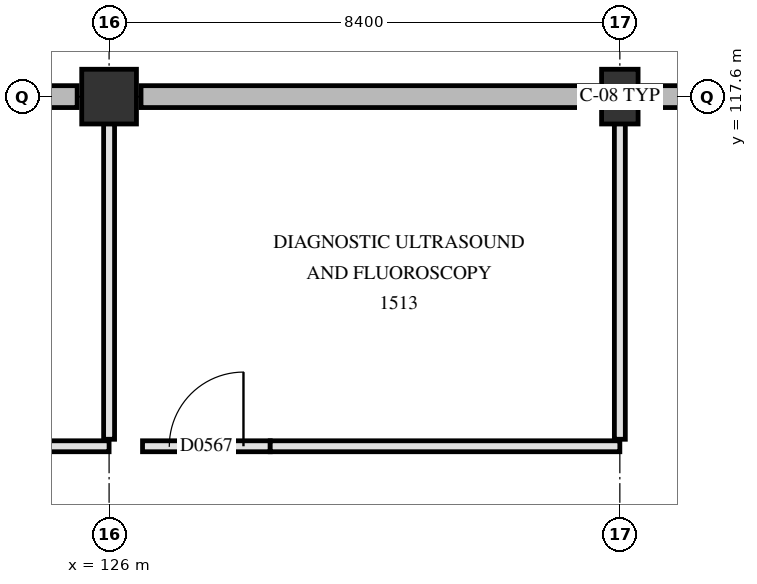
"""IFC4 building model, lengths in metres.
Left out: names, types, materials, properties, quantities, classifications, styles, units other than length and angle.
Written with IfcOpenShell. Run it as: python <this file> out.ifc"""

import sys

from ifc_helpers import new_model, si_unit, direction, frame, frame_2d, origin, origin_2d, place, context, subcontext, project, spatial, rectangle, extrude, element, fill, save


model = new_model("IFC4")
c1 = context("Model", 3, precision=1e-05, world=origin(), true_north=direction((0.0, 1.0)))
c2 = subcontext(c1, "Body", "Model", "MODEL_VIEW")
j1 = project(units=[si_unit("LENGTHUNIT", "METRE"), si_unit("PLANEANGLEUNIT", "RADIAN")], contexts=[c1])
p1 = place(None, origin())
s1 = spatial("IfcSite", under=j1, at=p1, CompositionType="ELEMENT")
p2 = place(p1, origin())
s2 = spatial("IfcBuilding", under=s1, at=p2, CompositionType="ELEMENT")
p3 = place(p2, origin())
s3 = spatial("IfcBuildingStorey", under=s2, at=p3, CompositionType="ELEMENT", Elevation=0.0)
p4 = place(p3, frame((126.0, 117.6, 0.0), z_axis=(0.0, 0.0, 1.0), x_axis=(1.0, 0.0, 0.0)))
e1 = element("IfcColumn", 1, at=p4, inside=s3, PredefinedType="COLUMN", context=c2, shape_type="SweptSolid", body=[
    extrude(rectangle(XDim=0.9, YDim=0.9, at=origin_2d()), origin(), (0.0, 0.0, 1.0), 4.8),
])
p5 = place(p3, frame((134.4, 117.6, 0.0), z_axis=(0.0, 0.0, 1.0), x_axis=(1.0, 0.0, 0.0)))
e2 = element("IfcColumn", 2, at=p5, inside=s3, PredefinedType="PILASTER", context=c2, shape_type="SweptSolid", body=[
    extrude(rectangle(XDim=0.6, YDim=0.9, at=origin_2d()), origin(), (0.0, 0.0, 1.0), 4.8),
])
p6 = place(p3, frame((118.125, 117.6, 0.0), z_axis=(0.0, 0.0, 1.0), x_axis=(1.0, 0.0, 0.0)))
e3 = element("IfcWall", 3, at=p6, inside=s3, PredefinedType="SOLIDWALL", context=c2, shape_type="SweptSolid", body=[
    extrude(rectangle(XDim=7.35, YDim=0.36, at=frame_2d((3.675, 0.0))), origin(), (0.0, 0.0, 1.0), 4.5),
])
p7 = place(p3, frame((126.525, 117.6, 0.0), z_axis=(0.0, 0.0, 1.0), x_axis=(1.0, 0.0, 0.0)))
e4 = element("IfcWall", 4, at=p7, inside=s3, PredefinedType="SOLIDWALL", context=c2, shape_type="SweptSolid", body=[
    extrude(rectangle(XDim=7.5, YDim=0.36, at=frame_2d((3.75, 0.0))), origin(), (0.0, 0.0, 1.0), 4.5),
])
p8 = place(p3, frame((134.775, 117.6, 0.0), z_axis=(0.0, 0.0, 1.0), x_axis=(1.0, 0.0, 0.0)))
e5 = element("IfcWall", 5, at=p8, inside=s3, PredefinedType="SOLIDWALL", context=c2, shape_type="SweptSolid", body=[
    extrude(rectangle(XDim=7.55, YDim=0.36, at=frame_2d((3.775, 0.0))), origin(), (0.0, 0.0, 1.0), 4.5),
])
p9 = place(p3, frame((117.6, 111.85, 0.0), z_axis=(0.0, 0.0, 1.0), x_axis=(1.0, 0.0, 0.0)))
e6 = element("IfcWall", 6, at=p9, inside=s3, PredefinedType="PARTITIONING", context=c2, shape_type="SweptSolid", body=[
    extrude(rectangle(XDim=8.4, YDim=0.18, at=frame_2d((4.2, 0.0))), origin(), (0.0, 0.0, 1.0), 3.89),
])
p10 = place(p9, frame((3.625, 0.0, 0.0)))
e7 = element("IfcOpeningElement", 7, at=p10, cuts=e6, PredefinedType="OPENING", context=c2, shape_type="SweptSolid", body=[
    extrude(rectangle(XDim=1.15, YDim=2.15, at=frame_2d((0.575, 1.075))), frame((0.0, 0.1, 0.0), z_axis=(0.0, -1.0, 0.0), x_axis=(1.0, 0.0, 0.0)), (0.0, 0.0, 1.0), 0.2),
])
p11 = place(p3, frame((126.55, 111.85, 0.0), z_axis=(0.0, 0.0, 1.0), x_axis=(1.0, 0.0, 0.0)))
e8 = element("IfcWall", 8, at=p11, inside=s3, PredefinedType="PARTITIONING", context=c2, shape_type="SweptSolid", body=[
    extrude(rectangle(XDim=2.1, YDim=0.18, at=frame_2d((1.05, 0.0))), origin(), (0.0, 0.0, 1.0), 4.49),
])
p12 = place(p11, frame((0.44, 0.0, 0.0)))
e9 = element("IfcOpeningElement", 9, at=p12, cuts=e8, PredefinedType="OPENING", context=c2, shape_type="SweptSolid", body=[
    extrude(rectangle(XDim=1.22, YDim=2.18, at=frame_2d((0.61, 1.09))), frame((0.0, 0.1, 0.0), z_axis=(0.0, -1.0, 0.0), x_axis=(1.0, 0.0, 0.0)), (0.0, 0.0, 1.0), 0.2),
])
p13 = place(p3, frame((128.65, 111.85, 0.0), z_axis=(0.0, 0.0, 1.0), x_axis=(1.0, 0.0, 0.0)))
e10 = element("IfcWall", 10, at=p13, inside=s3, PredefinedType="PARTITIONING", context=c2, shape_type="SweptSolid", body=[
    extrude(rectangle(XDim=5.75, YDim=0.18, at=frame_2d((2.875, 0.0))), origin(), (0.0, 0.0, 1.0), 3.89),
])
for number, where, z_axis, x_axis in (
    (11, (126.0, 111.965, 0.0), (0.0, 0.0, 1.0), (0.0, 1.0, 0.0)),
    (12, (134.4, 111.965, 0.0), (0.0, 0.0, 1.0), (0.0, 1.0, 0.0)),
):
    element("IfcWall", number, at=place(p3, frame(where, z_axis=z_axis, x_axis=x_axis)), inside=s3, PredefinedType="PARTITIONING", context=c2, shape_type="SweptSolid", body=[
        extrude(rectangle(XDim=5.19, YDim=0.18, at=frame_2d((2.595, 0.0))), origin(), (0.0, 0.0, 1.0), 3.89),
    ])
p14 = place(p12, origin())
e13 = element("IfcDoor", 13, at=p14, inside=s3, OperationType="SINGLE_SWING_RIGHT", PredefinedType="DOOR", context=c2, shape_type="SweptSolid", body=[
    extrude(rectangle(XDim=1.22, YDim=2.18, at=frame_2d((0.61, 1.09))), frame((0.0, 0.025, 0.0), z_axis=(0.0, -1.0, 0.0), x_axis=(1.0, 0.0, 0.0)), (0.0, 0.0, 1.0), 0.05),
])
fill(e9, e13)
save(model, sys.argv[1])
